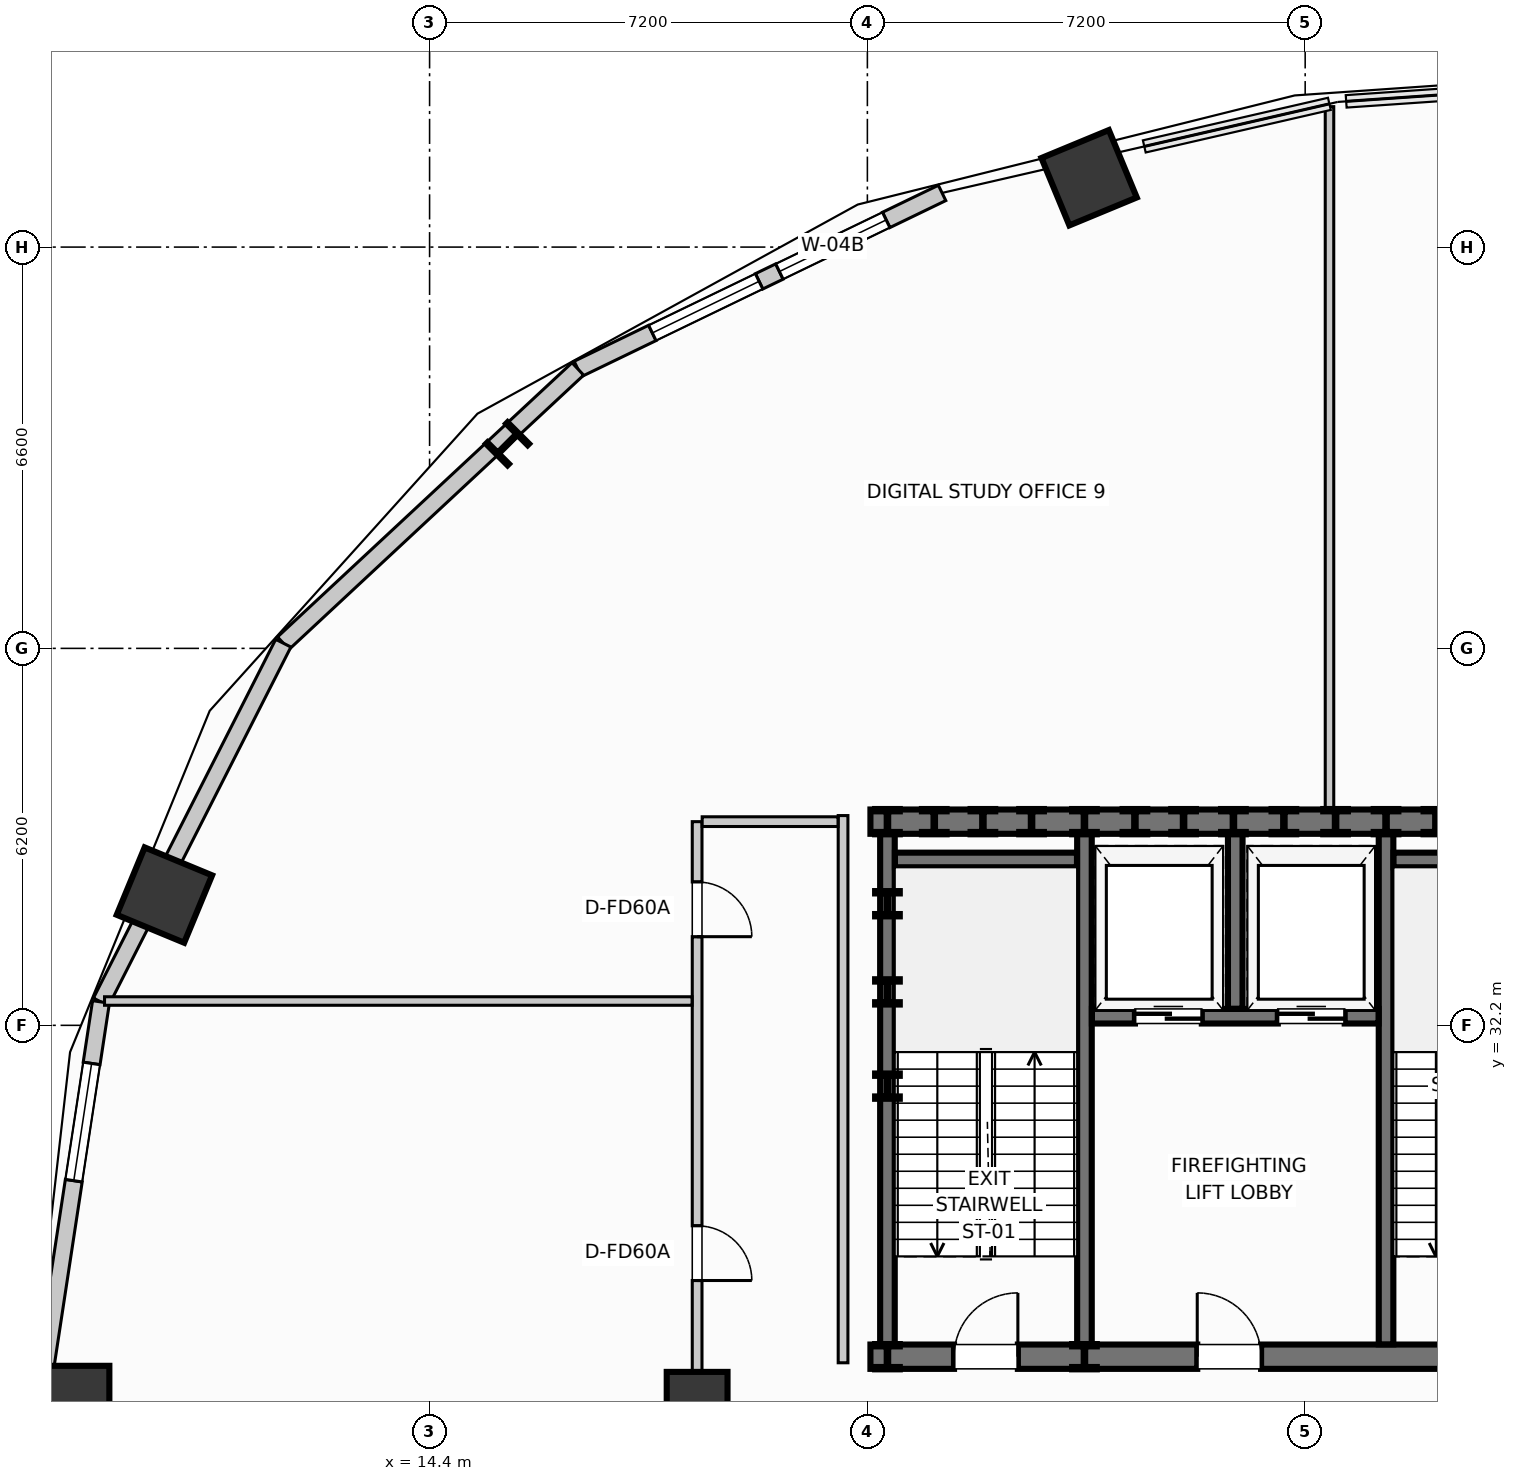
"""IFC4 building model, lengths in metres.
Left out: names, types, materials, properties, quantities, classifications, styles, units other than length and angle.
Written with IfcOpenShell. Run it as: python <this file> out.ifc"""

import sys

from ifc_helpers import new_model, si_unit, direction, frame, frame_2d, origin, origin_2d, place, context, subcontext, project, spatial, rectangle, i_section, extrude, element, fill, save


model = new_model("IFC4")
c1 = context("Model", 3, precision=1e-05, world=origin(), true_north=direction((0.0, 1.0)))
c2 = subcontext(c1, "Body", "Model", "MODEL_VIEW")
j1 = project(units=[si_unit("LENGTHUNIT", "METRE"), si_unit("PLANEANGLEUNIT", "RADIAN")], contexts=[c1])
p1 = place(None, origin())
s1 = spatial("IfcSite", under=j1, at=p1, CompositionType="ELEMENT")
p2 = place(p1, origin())
s2 = spatial("IfcBuilding", under=s1, at=p2, CompositionType="ELEMENT")
p3 = place(p2, frame((0.0, 0.0, 200.35)))
s3 = spatial("IfcBuildingStorey", under=s2, at=p3, CompositionType="ELEMENT", Elevation=200.35)
for number, where, z_axis, x_axis in (
    (1, (21.93, 35.55, 0.0), (0.0, 0.0, 1.0), (1.0, 0.0, 0.0)),
    (2, (23.5, 35.55, 0.0), (0.0, 0.0, 1.0), (1.0, 0.0, 0.0)),
    (3, (25.17, 35.55, 0.0), (0.0, 0.0, 1.0), (1.0, 0.0, 0.0)),
    (4, (26.8, 35.55, 0.0), (0.0, 0.0, 1.0), (1.0, 0.0, 0.0)),
    (5, (28.45, 35.55, 0.0), (0.0, 0.0, 1.0), (1.0, 0.0, 0.0)),
    (6, (30.13, 35.55, 0.0), (0.0, 0.0, 1.0), (1.0, 0.0, 0.0)),
    (7, (21.93, 26.75, 0.0), (0.0, 0.0, 1.0), (1.0, 0.0, 0.0)),
    (8, (25.17, 26.75, 0.0), (0.0, 0.0, 1.0), (1.0, 0.0, 0.0)),
    (9, (21.93, 31.2, 0.0), (0.0, 0.0, 1.0), (1.0, 0.0, 0.0)),
    (10, (21.93, 32.75, 0.0), (0.0, 0.0, 1.0), (1.0, 0.0, 0.0)),
    (11, (21.93, 34.2, 0.0), (0.0, 0.0, 1.0), (1.0, 0.0, 0.0)),
    (12, (22.7, 35.55, 0.0), (0.0, 0.0, 1.0), (1.0, 0.0, 0.0)),
    (13, (27.62, 35.55, 0.0), (0.0, 0.0, 1.0), (1.0, 0.0, 0.0)),
    (14, (24.3, 35.55, 0.0), (0.0, 0.0, 1.0), (1.0, 0.0, 0.0)),
    (15, (26.0, 35.55, 0.0), (0.0, 0.0, 1.0), (1.0, 0.0, 0.0)),
    (16, (29.3, 35.55, 0.0), (0.0, 0.0, 1.0), (1.0, 0.0, 0.0)),
    (17, (30.95, 35.55, 0.0), (0.0, 0.0, 1.0), (1.0, 0.0, 0.0)),
):
    element("IfcColumn", number, at=place(p3, frame(where, z_axis=z_axis, x_axis=x_axis)), inside=s3, PredefinedType="COLUMN", context=c2, shape_type="SweptSolid", body=[
        extrude(i_section(OverallWidth=0.406, OverallDepth=0.416, WebThickness=0.024, FlangeThickness=0.039, at=origin_2d()), origin(), (0.0, 0.0, 1.0), 4.5),
    ])
p4 = place(p3, frame((18.8, 26.0, 0.0), z_axis=(0.0, 0.0, 1.0), x_axis=(1.0, 0.0, 0.0)))
e18 = element("IfcColumn", 18, at=p4, inside=s3, PredefinedType="COLUMN", context=c2, shape_type="SweptSolid", body=[
    extrude(rectangle(XDim=1.0, YDim=1.0, at=origin_2d()), origin(), (0.0, 0.0, 1.0), 4.5),
])
p5 = place(p3, frame((25.247, 46.141, 0.0), z_axis=(0.0, 0.0, 1.0), x_axis=(-0.382683432365, 0.923879532511, 0.0)))
e19 = element("IfcColumn", 19, at=p5, inside=s3, PredefinedType="COLUMN", context=c2, shape_type="SweptSolid", body=[
    extrude(rectangle(XDim=1.2, YDim=1.2, at=origin_2d()), origin(), (0.0, 0.0, 1.0), 4.5),
])
p6 = place(p3, frame((15.682, 41.765, 0.0), z_axis=(0.0, 0.0, 1.0), x_axis=(-0.707106781187, 0.707106781187, 0.0)))
e20 = element("IfcColumn", 20, at=p6, inside=s3, PredefinedType="COLUMN", context=c2, shape_type="SweptSolid", body=[
    extrude(i_section(OverallWidth=0.5, OverallDepth=0.5, WebThickness=0.022, FlangeThickness=0.032, at=origin_2d()), origin(), (0.0, 0.0, 1.0), 4.5),
])
for number, where, z_axis, x_axis in (
    (21, (10.039, 34.343, 0.0), (0.0, 0.0, 1.0), (-0.924, 0.383, 0.0)),
    (22, (8.534, 26.0, 0.0), (0.0, 0.0, 1.0), (-1.0, 0.0, 0.0)),
):
    element("IfcColumn", number, at=place(p3, frame(where, z_axis=z_axis, x_axis=x_axis)), inside=s3, PredefinedType="COLUMN", context=c2, shape_type="SweptSolid", body=[
        extrude(rectangle(XDim=1.2, YDim=1.2, at=origin_2d()), origin(), (0.0, 0.0, 1.0), 4.5),
    ])
p7 = place(p3, frame((22.829, 45.891, 0.0), z_axis=(0.0, 0.0, 1.0), x_axis=(-0.900371236029, -0.435122554381, 0.0)))
e23 = element("IfcWall", 23, at=p7, inside=s3, PredefinedType="STANDARD", context=c2, shape_type="SweptSolid", body=[
    extrude(rectangle(XDim=6.653, YDim=0.28, at=frame_2d((3.327, 0.0))), origin(), (0.0, 0.0, 1.0), 4.26),
])
p8 = place(p7, frame((1.021, 0.0, 0.75)))
e24 = element("IfcOpeningElement", 24, at=p8, cuts=e23, PredefinedType="OPENING", context=c2, shape_type="SweptSolid", body=[
    extrude(rectangle(XDim=1.95, YDim=1.68, at=frame_2d((0.975, 0.84))), frame((0.0, 0.15, 0.0), z_axis=(0.0, -1.0, 0.0), x_axis=(1.0, 0.0, 0.0)), (0.0, 0.0, 1.0), 0.3),
])
p9 = place(p7, frame((3.343, 0.0, 0.75)))
e25 = element("IfcOpeningElement", 25, at=p9, cuts=e23, PredefinedType="OPENING", context=c2, shape_type="SweptSolid", body=[
    extrude(rectangle(XDim=1.95, YDim=1.68, at=frame_2d((0.975, 0.84))), frame((0.0, 0.15, 0.0), z_axis=(0.0, -1.0, 0.0), x_axis=(1.0, 0.0, 0.0)), (0.0, 0.0, 1.0), 0.3),
])
p10 = place(p3, frame((16.838, 42.996, 0.0), z_axis=(0.0, 0.0, 1.0), x_axis=(-0.731833707499, -0.681483253329, 0.0)))
e26 = element("IfcWall", 26, at=p10, inside=s3, PredefinedType="STANDARD", context=c2, shape_type="SweptSolid", body=[
    extrude(rectangle(XDim=6.619, YDim=0.28, at=frame_2d((3.309, 0.0))), origin(), (0.0, 0.0, 1.0), 3.691),
])
p11 = place(p3, frame((11.994, 38.485, 0.0), z_axis=(0.0, 0.0, 1.0), x_axis=(-0.453032066879, -0.89149422117, 0.0)))
e27 = element("IfcWall", 27, at=p11, inside=s3, PredefinedType="STANDARD", context=c2, shape_type="SweptSolid", body=[
    extrude(rectangle(XDim=6.619, YDim=0.28, at=frame_2d((3.31, 0.0))), origin(), (0.0, 0.0, 1.0), 3.691),
])
p12 = place(p3, frame((8.996, 32.585, 0.0), z_axis=(0.0, 0.0, 1.0), x_axis=(-0.150467697578, -0.988614926038, 0.0)))
e28 = element("IfcWall", 28, at=p12, inside=s3, PredefinedType="STANDARD", context=c2, shape_type="SweptSolid", body=[
    extrude(rectangle(XDim=6.661, YDim=0.28, at=frame_2d((3.33, 0.0))), origin(), (0.0, 0.0, 1.0), 4.26),
])
p13 = place(p12, frame((1.023, 0.0, 0.75)))
e29 = element("IfcOpeningElement", 29, at=p13, cuts=e28, PredefinedType="OPENING", context=c2, shape_type="SweptSolid", body=[
    extrude(rectangle(XDim=1.95, YDim=1.68, at=frame_2d((0.975, 0.84))), frame((0.0, 0.15, 0.0), z_axis=(0.0, -1.0, 0.0), x_axis=(1.0, 0.0, 0.0)), (0.0, 0.0, 1.0), 0.3),
])
p14 = place(p3, frame((7.994, 26.0, 0.0), z_axis=(0.0, 0.0, 1.0), x_axis=(0.150467697578, -0.988614926038, 0.0)))
e30 = element("IfcWall", 30, at=p14, inside=s3, PredefinedType="STANDARD", context=c2, shape_type="SweptSolid", body=[
    extrude(rectangle(XDim=6.661, YDim=0.28, at=frame_2d((3.33, 0.0))), origin(), (0.0, 0.0, 1.0), 4.26),
])
p15 = place(p14, frame((3.047, 0.0, 0.75)))
e31 = element("IfcOpeningElement", 31, at=p15, cuts=e30, PredefinedType="OPENING", context=c2, shape_type="SweptSolid", body=[
    extrude(rectangle(XDim=1.95, YDim=1.68, at=frame_2d((0.975, 0.84))), frame((0.0, 0.15, 0.0), z_axis=(0.0, -1.0, 0.0), x_axis=(1.0, 0.0, 0.0)), (0.0, 0.0, 1.0), 0.3),
])
p16 = place(p3, frame((21.65, 26.75, 0.0), z_axis=(0.0, 0.0, 1.0), x_axis=(1.0, 0.0, 0.0)))
e32 = element("IfcWall", 32, at=p16, inside=s3, PredefinedType="SHEAR", context=c2, shape_type="SweptSolid", body=[
    extrude(rectangle(XDim=28.7, YDim=0.4, at=frame_2d((14.35, 0.0))), origin(), (0.0, 0.0, 1.0), 4.5),
])
p17 = place(p16, frame((1.375, 0.0, 0.0)))
e33 = element("IfcOpeningElement", 33, at=p17, cuts=e32, PredefinedType="OPENING", context=c2, shape_type="SweptSolid", body=[
    extrude(rectangle(XDim=1.05, YDim=2.0, at=frame_2d((0.525, 1.0))), frame((0.0, 0.21, 0.0), z_axis=(0.0, -1.0, 0.0), x_axis=(1.0, 0.0, 0.0)), (0.0, 0.0, 1.0), 0.42),
])
p18 = place(p16, frame((5.375, 0.0, 0.0)))
e34 = element("IfcOpeningElement", 34, at=p18, cuts=e32, PredefinedType="OPENING", context=c2, shape_type="SweptSolid", body=[
    extrude(rectangle(XDim=1.05, YDim=2.0, at=frame_2d((0.525, 1.0))), frame((0.0, 0.21, 0.0), z_axis=(0.0, -1.0, 0.0), x_axis=(1.0, 0.0, 0.0)), (0.0, 0.0, 1.0), 0.42),
])
p19 = place(p16, frame((9.575, 0.0, 0.0)))
e35 = element("IfcOpeningElement", 35, at=p19, cuts=e32, PredefinedType="OPENING", context=c2, shape_type="SweptSolid", body=[
    extrude(rectangle(XDim=1.05, YDim=2.0, at=frame_2d((0.525, 1.0))), frame((0.0, 0.21, 0.0), z_axis=(0.0, -1.0, 0.0), x_axis=(1.0, 0.0, 0.0)), (0.0, 0.0, 1.0), 0.42),
])
p20 = place(p16, frame((19.705, 0.0, 0.0)))
e36 = element("IfcOpeningElement", 36, at=p20, cuts=e32, PredefinedType="OPENING", context=c2, shape_type="SweptSolid", body=[
    extrude(rectangle(XDim=1.45, YDim=2.0, at=frame_2d((0.725, 1.0))), frame((0.0, 0.21, 0.0), z_axis=(0.0, -1.0, 0.0), x_axis=(1.0, 0.0, 0.0)), (0.0, 0.0, 1.0), 0.42),
])
p21 = place(p16, frame((26.275, 0.0, 0.0)))
e37 = element("IfcOpeningElement", 37, at=p21, cuts=e32, PredefinedType="OPENING", context=c2, shape_type="SweptSolid", body=[
    extrude(rectangle(XDim=1.05, YDim=2.0, at=frame_2d((0.525, 1.0))), frame((0.0, 0.21, 0.0), z_axis=(0.0, -1.0, 0.0), x_axis=(1.0, 0.0, 0.0)), (0.0, 0.0, 1.0), 0.42),
])
p22 = place(p3, frame((50.35, 35.55, 0.0), z_axis=(0.0, 0.0, 1.0), x_axis=(-1.0, 0.0, 0.0)))
e38 = element("IfcWall", 38, at=p22, inside=s3, PredefinedType="SHEAR", context=c2, shape_type="SweptSolid", body=[
    extrude(rectangle(XDim=28.7, YDim=0.4, at=frame_2d((14.35, 0.0))), origin(), (0.0, 0.0, 1.0), 4.5),
])
for number, where, z_axis, x_axis in (
    (39, (21.93, 35.347, 0.0), (0.0, 0.0, 1.0), (0.0, -1.0, 0.0)),
    (40, (25.17, 26.953, 0.0), (0.0, 0.0, 1.0), (0.0, 1.0, 0.0)),
):
    element("IfcWall", number, at=place(p3, frame(where, z_axis=z_axis, x_axis=x_axis)), inside=s3, PredefinedType="SHEAR", context=c2, shape_type="SweptSolid", body=[
        extrude(rectangle(XDim=8.394, YDim=0.24, at=frame_2d((4.197, 0.0))), origin(), (0.0, 0.0, 1.0), 4.5),
    ])
p23 = place(p3, frame((22.053, 34.92, 0.0), z_axis=(0.0, 0.0, 1.0), x_axis=(1.0, 0.0, 0.0)))
e41 = element("IfcWall", 41, at=p23, inside=s3, PredefinedType="SHEAR", context=c2, shape_type="SweptSolid", body=[
    extrude(rectangle(XDim=2.994, YDim=0.24, at=frame_2d((1.497, 0.0))), origin(), (0.0, 0.0, 1.0), 4.5),
])
p24 = place(p3, frame((30.13, 26.953, 0.0), z_axis=(0.0, 0.0, 1.0), x_axis=(0.0, 1.0, 0.0)))
e42 = element("IfcWall", 42, at=p24, inside=s3, PredefinedType="SHEAR", context=c2, shape_type="SweptSolid", body=[
    extrude(rectangle(XDim=8.394, YDim=0.24, at=frame_2d((4.197, 0.0))), origin(), (0.0, 0.0, 1.0), 4.5),
])
p25 = place(p3, frame((30.253, 34.92, 0.0), z_axis=(0.0, 0.0, 1.0), x_axis=(1.0, 0.0, 0.0)))
e43 = element("IfcWall", 43, at=p25, inside=s3, PredefinedType="SHEAR", context=c2, shape_type="SweptSolid", body=[
    extrude(rectangle(XDim=2.994, YDim=0.24, at=frame_2d((1.497, 0.0))), origin(), (0.0, 0.0, 1.0), 4.5),
])
p26 = place(p3, frame((25.293, 32.35, 0.0), z_axis=(0.0, 0.0, 1.0), x_axis=(1.0, 0.0, 0.0)))
e44 = element("IfcWall", 44, at=p26, inside=s3, PredefinedType="SHEAR", context=c2, shape_type="SweptSolid", body=[
    extrude(rectangle(XDim=4.714, YDim=0.24, at=frame_2d((2.357, 0.0))), origin(), (0.0, 0.0, 1.0), 4.5),
])
p27 = place(p26, frame((0.707, 0.0, 0.0)))
e45 = element("IfcOpeningElement", 45, at=p27, cuts=e44, PredefinedType="OPENING", context=c2, shape_type="SweptSolid", body=[
    extrude(rectangle(XDim=1.1, YDim=2.0, at=frame_2d((0.55, 1.0))), frame((0.0, 0.13, 0.0), z_axis=(0.0, -1.0, 0.0), x_axis=(1.0, 0.0, 0.0)), (0.0, 0.0, 1.0), 0.26),
])
p28 = place(p26, frame((3.057, 0.0, 0.0)))
e46 = element("IfcOpeningElement", 46, at=p28, cuts=e44, PredefinedType="OPENING", context=c2, shape_type="SweptSolid", body=[
    extrude(rectangle(XDim=1.1, YDim=2.0, at=frame_2d((0.55, 1.0))), frame((0.0, 0.13, 0.0), z_axis=(0.0, -1.0, 0.0), x_axis=(1.0, 0.0, 0.0)), (0.0, 0.0, 1.0), 0.26),
])
p29 = place(p3, frame((27.65, 32.473, 0.0), z_axis=(0.0, 0.0, 1.0), x_axis=(0.0, 1.0, 0.0)))
e47 = element("IfcWall", 47, at=p29, inside=s3, PredefinedType="SHEAR", context=c2, shape_type="SweptSolid", body=[
    extrude(rectangle(XDim=2.874, YDim=0.24, at=frame_2d((1.437, 0.0))), origin(), (0.0, 0.0, 1.0), 4.5),
])
p30 = place(p3, frame((18.8, 19.8, 0.0), z_axis=(0.0, 0.0, 1.0), x_axis=(0.0, 1.0, 0.0)))
e48 = element("IfcWall", 48, at=p30, inside=s3, PredefinedType="PARTITIONING", context=c2, shape_type="SweptSolid", body=[
    extrude(rectangle(XDim=15.75, YDim=0.16, at=frame_2d((7.875, 0.0))), origin(), (0.0, 0.0, 1.0), 4.245),
])
p31 = place(p30, frame((8.203, 0.0, 0.0)))
e49 = element("IfcOpeningElement", 49, at=p31, cuts=e48, PredefinedType="OPENING", context=c2, shape_type="SweptSolid", body=[
    extrude(rectangle(XDim=0.9, YDim=2.0, at=frame_2d((0.45, 1.0))), frame((0.0, 0.09, 0.0), z_axis=(0.0, -1.0, 0.0), x_axis=(1.0, 0.0, 0.0)), (0.0, 0.0, 1.0), 0.18),
])
p32 = place(p30, frame((13.858, 0.0, 0.0)))
e50 = element("IfcOpeningElement", 50, at=p32, cuts=e48, PredefinedType="OPENING", context=c2, shape_type="SweptSolid", body=[
    extrude(rectangle(XDim=0.9, YDim=2.0, at=frame_2d((0.45, 1.0))), frame((0.0, 0.09, 0.0), z_axis=(0.0, -1.0, 0.0), x_axis=(1.0, 0.0, 0.0)), (0.0, 0.0, 1.0), 0.18),
])
p33 = place(p3, frame((21.2, 26.65, 0.0), z_axis=(0.0, 0.0, 1.0), x_axis=(0.0, 1.0, 0.0)))
e51 = element("IfcWall", 51, at=p33, inside=s3, PredefinedType="PARTITIONING", context=c2, shape_type="SweptSolid", body=[
    extrude(rectangle(XDim=9.0, YDim=0.16, at=frame_2d((4.5, 0.0))), origin(), (0.0, 0.0, 1.0), 4.245),
])
p34 = place(p3, frame((18.883, 35.55, 0.0), z_axis=(0.0, 0.0, 1.0), x_axis=(1.0, 0.0, 0.0)))
e52 = element("IfcWall", 52, at=p34, inside=s3, PredefinedType="PARTITIONING", context=c2, shape_type="SweptSolid", body=[
    extrude(rectangle(XDim=2.234, YDim=0.16, at=frame_2d((1.117, 0.0))), origin(), (0.0, 0.0, 1.0), 4.245),
])
p35 = place(p3, frame((9.054, 32.6, 0.0), z_axis=(0.0, 0.0, 1.0), x_axis=(1.0, 0.0, 0.0)))
e53 = element("IfcWall", 53, at=p35, inside=s3, PredefinedType="PARTITIONING", context=c2, shape_type="SweptSolid", body=[
    extrude(rectangle(XDim=9.663, YDim=0.14, at=frame_2d((4.832, 0.0))), origin(), (0.0, 0.0, 1.0), 4.245),
])
p36 = place(p3, frame((29.2, 35.753, 0.0), z_axis=(0.0, 0.0, 1.0), x_axis=(0.0, 1.0, 0.0)))
e54 = element("IfcWall", 54, at=p36, inside=s3, PredefinedType="PARTITIONING", context=c2, shape_type="SweptSolid", body=[
    extrude(rectangle(XDim=11.557, YDim=0.14, at=frame_2d((5.779, 0.0))), origin(), (0.0, 0.0, 1.0), 4.245),
])
p37 = place(p8, origin())
e55 = element("IfcWindow", 55, at=p37, inside=s3, PartitioningType="SINGLE_PANEL", PredefinedType="WINDOW", context=c2, shape_type="SweptSolid", body=[
    extrude(rectangle(XDim=1.95, YDim=1.68, at=frame_2d((0.975, 0.84))), frame((0.0, 0.03, 0.0), z_axis=(0.0, -1.0, 0.0), x_axis=(1.0, 0.0, 0.0)), (0.0, 0.0, 1.0), 0.06),
])
fill(e24, e55)
p38 = place(p9, origin())
e56 = element("IfcWindow", 56, at=p38, inside=s3, PartitioningType="SINGLE_PANEL", PredefinedType="WINDOW", context=c2, shape_type="SweptSolid", body=[
    extrude(rectangle(XDim=1.95, YDim=1.68, at=frame_2d((0.975, 0.84))), frame((0.0, 0.03, 0.0), z_axis=(0.0, -1.0, 0.0), x_axis=(1.0, 0.0, 0.0)), (0.0, 0.0, 1.0), 0.06),
])
fill(e25, e56)
p39 = place(p13, origin())
e57 = element("IfcWindow", 57, at=p39, inside=s3, PartitioningType="SINGLE_PANEL", PredefinedType="WINDOW", context=c2, shape_type="SweptSolid", body=[
    extrude(rectangle(XDim=1.95, YDim=1.68, at=frame_2d((0.975, 0.84))), frame((0.0, 0.03, 0.0), z_axis=(0.0, -1.0, 0.0), x_axis=(1.0, 0.0, 0.0)), (0.0, 0.0, 1.0), 0.06),
])
fill(e29, e57)
p40 = place(p17, origin())
e58 = element("IfcDoor", 58, at=p40, inside=s3, OperationType="SINGLE_SWING_RIGHT", PredefinedType="DOOR", context=c2, shape_type="SweptSolid", body=[
    extrude(rectangle(XDim=1.05, YDim=2.0, at=frame_2d((0.525, 1.0))), frame((0.0, 0.025, 0.0), z_axis=(0.0, -1.0, 0.0), x_axis=(1.0, 0.0, 0.0)), (0.0, 0.0, 1.0), 0.05),
])
fill(e33, e58)
p41 = place(p18, origin())
e59 = element("IfcDoor", 59, at=p41, inside=s3, OperationType="SINGLE_SWING_LEFT", PredefinedType="DOOR", context=c2, shape_type="SweptSolid", body=[
    extrude(rectangle(XDim=1.05, YDim=2.0, at=frame_2d((0.525, 1.0))), frame((0.0, 0.025, 0.0), z_axis=(0.0, -1.0, 0.0), x_axis=(1.0, 0.0, 0.0)), (0.0, 0.0, 1.0), 0.05),
])
fill(e34, e59)
p42 = place(p27, origin())
e60 = element("IfcDoor", 60, at=p42, inside=s3, OperationType="DOUBLE_DOOR_SLIDING", PredefinedType="USERDEFINED", context=c2, shape_type="SweptSolid", body=[
    extrude(rectangle(XDim=1.1, YDim=2.0, at=frame_2d((0.55, 1.0))), frame((0.0, 0.025, 0.0), z_axis=(0.0, -1.0, 0.0), x_axis=(1.0, 0.0, 0.0)), (0.0, 0.0, 1.0), 0.05),
])
fill(e45, e60)
p43 = place(p28, origin())
e61 = element("IfcDoor", 61, at=p43, inside=s3, OperationType="DOUBLE_DOOR_SLIDING", PredefinedType="USERDEFINED", context=c2, shape_type="SweptSolid", body=[
    extrude(rectangle(XDim=1.1, YDim=2.0, at=frame_2d((0.55, 1.0))), frame((0.0, 0.025, 0.0), z_axis=(0.0, -1.0, 0.0), x_axis=(1.0, 0.0, 0.0)), (0.0, 0.0, 1.0), 0.05),
])
fill(e46, e61)
p44 = place(p31, frame((0.9, 0.0, 0.0), z_axis=(0.0, 0.0, 1.0), x_axis=(-1.0, 0.0, 0.0)))
e62 = element("IfcDoor", 62, at=p44, inside=s3, OperationType="SINGLE_SWING_RIGHT", PredefinedType="DOOR", context=c2, shape_type="SweptSolid", body=[
    extrude(rectangle(XDim=0.9, YDim=2.0, at=frame_2d((0.45, 1.0))), frame((0.0, 0.025, 0.0), z_axis=(0.0, -1.0, 0.0), x_axis=(1.0, 0.0, 0.0)), (0.0, 0.0, 1.0), 0.05),
])
fill(e49, e62)
p45 = place(p32, frame((0.9, 0.0, 0.0), z_axis=(0.0, 0.0, 1.0), x_axis=(-1.0, 0.0, 0.0)))
e63 = element("IfcDoor", 63, at=p45, inside=s3, OperationType="SINGLE_SWING_RIGHT", PredefinedType="DOOR", context=c2, shape_type="SweptSolid", body=[
    extrude(rectangle(XDim=0.9, YDim=2.0, at=frame_2d((0.45, 1.0))), frame((0.0, 0.025, 0.0), z_axis=(0.0, -1.0, 0.0), x_axis=(1.0, 0.0, 0.0)), (0.0, 0.0, 1.0), 0.05),
])
fill(e50, e63)
save(model, sys.argv[1])
